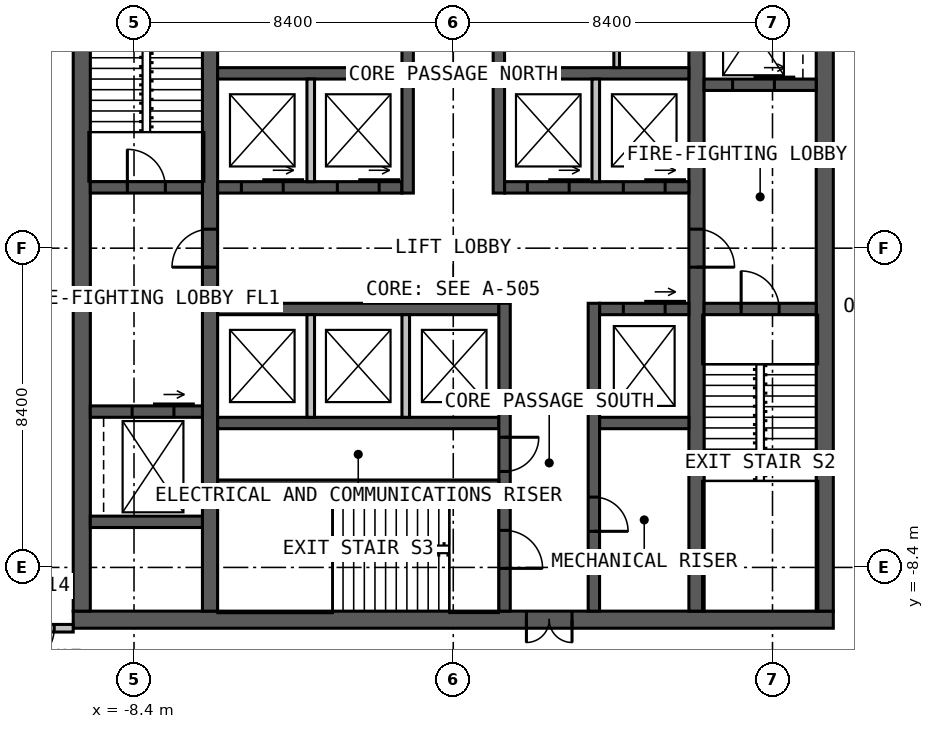
"""IFC4 building model, lengths in metres.
Left out: names, types, materials, properties, quantities, classifications, styles, units other than length and angle.
Written with IfcOpenShell. Run it as: python <this file> out.ifc"""

import sys

from ifc_helpers import new_model, si_unit, direction, frame, frame_2d, origin, place, context, subcontext, project, spatial, rectangle, extrude, element, fill, save


model = new_model("IFC4")
c1 = context("Model", 3, precision=1e-05, world=origin(), true_north=direction((0.0, 1.0)))
c2 = subcontext(c1, "Body", "Model", "MODEL_VIEW")
j1 = project(units=[si_unit("LENGTHUNIT", "METRE"), si_unit("PLANEANGLEUNIT", "RADIAN")], contexts=[c1])
p1 = place(None, origin())
s1 = spatial("IfcSite", under=j1, at=p1, CompositionType="ELEMENT")
p2 = place(p1, origin())
s2 = spatial("IfcBuilding", under=s1, at=p2, CompositionType="ELEMENT")
p3 = place(p2, frame((0.0, 0.0, 179.0)))
s3 = spatial("IfcBuildingStorey", under=s2, at=p3, CompositionType="ELEMENT", Elevation=179.0)
p4 = place(p3, frame((10.0, -9.775, 0.0), z_axis=(0.0, 0.0, 1.0), x_axis=(-1.0, 0.0, 0.0)))
e1 = element("IfcWall", 1, at=p4, inside=s3, PredefinedType="SOLIDWALL", context=c2, shape_type="SweptSolid", body=[
    extrude(rectangle(XDim=20.0, YDim=0.45, at=frame_2d((10.0, 0.0))), origin(), (0.0, 0.0, 1.0), 4.0),
])
p5 = place(p4, frame((6.875, 0.0, 0.0)))
e2 = element("IfcOpeningElement", 2, at=p5, cuts=e1, PredefinedType="OPENING", context=c2, shape_type="SweptSolid", body=[
    extrude(rectangle(XDim=1.2, YDim=2.2, at=frame_2d((0.6, 1.1))), frame((0.0, 0.235, 0.0), z_axis=(0.0, -1.0, 0.0), x_axis=(1.0, 0.0, 0.0)), (0.0, 0.0, 1.0), 0.47),
])
for number, where, z_axis, x_axis in (
    (3, (9.775, -9.55, 0.0), (0.0, 0.0, 1.0), (0.0, 1.0, 0.0)),
    (4, (-9.775, 9.55, 0.0), (0.0, 0.0, 1.0), (0.0, -1.0, 0.0)),
):
    element("IfcWall", number, at=place(p3, frame(where, z_axis=z_axis, x_axis=x_axis)), inside=s3, PredefinedType="SOLIDWALL", context=c2, shape_type="SweptSolid", body=[
        extrude(rectangle(XDim=19.1, YDim=0.45, at=frame_2d((9.55, 0.0))), origin(), (0.0, 0.0, 1.0), 4.0),
    ])
p6 = place(p3, frame((-6.4, -9.55, 0.0), z_axis=(0.0, 0.0, 1.0), x_axis=(0.0, 1.0, 0.0)))
e5 = element("IfcWall", 5, at=p6, inside=s3, PredefinedType="SOLIDWALL", context=c2, shape_type="SweptSolid", body=[
    extrude(rectangle(XDim=19.1, YDim=0.4, at=frame_2d((9.55, 0.0))), origin(), (0.0, 0.0, 1.0), 4.0),
])
p7 = place(p6, frame((9.05, 0.0, 0.0)))
e6 = element("IfcOpeningElement", 6, at=p7, cuts=e5, PredefinedType="OPENING", context=c2, shape_type="SweptSolid", body=[
    extrude(rectangle(XDim=1.0, YDim=2.2, at=frame_2d((0.5, 1.1))), frame((0.0, 0.21, 0.0), z_axis=(0.0, -1.0, 0.0), x_axis=(1.0, 0.0, 0.0)), (0.0, 0.0, 1.0), 0.42),
])
p8 = place(p3, frame((6.4, 9.55, 0.0), z_axis=(0.0, 0.0, 1.0), x_axis=(0.0, -1.0, 0.0)))
e7 = element("IfcWall", 7, at=p8, inside=s3, PredefinedType="SOLIDWALL", context=c2, shape_type="SweptSolid", body=[
    extrude(rectangle(XDim=19.1, YDim=0.4, at=frame_2d((9.55, 0.0))), origin(), (0.0, 0.0, 1.0), 4.0),
])
p9 = place(p8, frame((9.05, 0.0, 0.0)))
e8 = element("IfcOpeningElement", 8, at=p9, cuts=e7, PredefinedType="OPENING", context=c2, shape_type="SweptSolid", body=[
    extrude(rectangle(XDim=1.0, YDim=2.2, at=frame_2d((0.5, 1.1))), frame((0.0, 0.21, 0.0), z_axis=(0.0, -1.0, 0.0), x_axis=(1.0, 0.0, 0.0)), (0.0, 0.0, 1.0), 0.42),
])
p10 = place(p3, frame((-6.2, 1.6, 0.0), z_axis=(0.0, 0.0, 1.0), x_axis=(1.0, 0.0, 0.0)))
e9 = element("IfcWall", 9, at=p10, inside=s3, PredefinedType="SOLIDWALL", context=c2, shape_type="SweptSolid", body=[
    extrude(rectangle(XDim=4.85, YDim=0.3, at=frame_2d((2.425, 0.0))), origin(), (0.0, 0.0, 1.0), 4.0),
])
p11 = place(p10, frame((0.625, 0.0, 0.0)))
e10 = element("IfcOpeningElement", 10, at=p11, cuts=e9, PredefinedType="OPENING", context=c2, shape_type="SweptSolid", body=[
    extrude(rectangle(XDim=1.1, YDim=2.2, at=frame_2d((0.55, 1.1))), frame((0.0, 0.16, 0.0), z_axis=(0.0, -1.0, 0.0), x_axis=(1.0, 0.0, 0.0)), (0.0, 0.0, 1.0), 0.32),
])
p12 = place(p10, frame((3.15, 0.0, 0.0)))
e11 = element("IfcOpeningElement", 11, at=p12, cuts=e9, PredefinedType="OPENING", context=c2, shape_type="SweptSolid", body=[
    extrude(rectangle(XDim=1.1, YDim=2.2, at=frame_2d((0.55, 1.1))), frame((0.0, 0.16, 0.0), z_axis=(0.0, -1.0, 0.0), x_axis=(1.0, 0.0, 0.0)), (0.0, 0.0, 1.0), 0.32),
])
p13 = place(p3, frame((1.35, 1.6, 0.0), z_axis=(0.0, 0.0, 1.0), x_axis=(1.0, 0.0, 0.0)))
e12 = element("IfcWall", 12, at=p13, inside=s3, PredefinedType="SOLIDWALL", context=c2, shape_type="SweptSolid", body=[
    extrude(rectangle(XDim=4.85, YDim=0.3, at=frame_2d((2.425, 0.0))), origin(), (0.0, 0.0, 1.0), 4.0),
])
p14 = place(p13, frame((0.6, 0.0, 0.0)))
e13 = element("IfcOpeningElement", 13, at=p14, cuts=e12, PredefinedType="OPENING", context=c2, shape_type="SweptSolid", body=[
    extrude(rectangle(XDim=1.1, YDim=2.2, at=frame_2d((0.55, 1.1))), frame((0.0, 0.16, 0.0), z_axis=(0.0, -1.0, 0.0), x_axis=(1.0, 0.0, 0.0)), (0.0, 0.0, 1.0), 0.32),
])
p15 = place(p13, frame((3.125, 0.0, 0.0)))
e14 = element("IfcOpeningElement", 14, at=p15, cuts=e12, PredefinedType="OPENING", context=c2, shape_type="SweptSolid", body=[
    extrude(rectangle(XDim=1.1, YDim=2.2, at=frame_2d((0.55, 1.1))), frame((0.0, 0.16, 0.0), z_axis=(0.0, -1.0, 0.0), x_axis=(1.0, 0.0, 0.0)), (0.0, 0.0, 1.0), 0.32),
])
for number, where, z_axis, x_axis in (
    (15, (-6.2, 4.6, 0.0), (0.0, 0.0, 1.0), (1.0, 0.0, 0.0)),
    (16, (1.35, 4.6, 0.0), (0.0, 0.0, 1.0), (1.0, 0.0, 0.0)),
):
    element("IfcWall", number, at=place(p3, frame(where, z_axis=z_axis, x_axis=x_axis)), inside=s3, PredefinedType="SOLIDWALL", context=c2, shape_type="SweptSolid", body=[
        extrude(rectangle(XDim=4.85, YDim=0.3, at=frame_2d((2.425, 0.0))), origin(), (0.0, 0.0, 1.0), 4.0),
    ])
p16 = place(p3, frame((-1.2, 1.45, 0.0), z_axis=(0.0, 0.0, 1.0), x_axis=(0.0, 1.0, 0.0)))
e17 = element("IfcWall", 17, at=p16, inside=s3, PredefinedType="SOLIDWALL", context=c2, shape_type="SweptSolid", body=[
    extrude(rectangle(XDim=8.1, YDim=0.3, at=frame_2d((4.05, 0.0))), origin(), (0.0, 0.0, 1.0), 4.0),
])
p17 = place(p16, frame((5.05, 0.0, 0.0)))
e18 = element("IfcOpeningElement", 18, at=p17, cuts=e17, PredefinedType="OPENING", context=c2, shape_type="SweptSolid", body=[
    extrude(rectangle(XDim=1.0, YDim=2.2, at=frame_2d((0.5, 1.1))), frame((0.0, 0.16, 0.0), z_axis=(0.0, -1.0, 0.0), x_axis=(1.0, 0.0, 0.0)), (0.0, 0.0, 1.0), 0.32),
])
p18 = place(p3, frame((1.2, 1.45, 0.0), z_axis=(0.0, 0.0, 1.0), x_axis=(0.0, 1.0, 0.0)))
e19 = element("IfcWall", 19, at=p18, inside=s3, PredefinedType="SOLIDWALL", context=c2, shape_type="SweptSolid", body=[
    extrude(rectangle(XDim=8.1, YDim=0.3, at=frame_2d((4.05, 0.0))), origin(), (0.0, 0.0, 1.0), 4.0),
])
p19 = place(p18, frame((3.8, 0.0, 0.0)))
e20 = element("IfcOpeningElement", 20, at=p19, cuts=e19, PredefinedType="OPENING", context=c2, shape_type="SweptSolid", body=[
    extrude(rectangle(XDim=1.0, YDim=2.2, at=frame_2d((0.5, 1.1))), frame((0.0, 0.16, 0.0), z_axis=(0.0, -1.0, 0.0), x_axis=(1.0, 0.0, 0.0)), (0.0, 0.0, 1.0), 0.32),
])
p20 = place(p18, frame((6.15, 0.0, 0.0)))
e21 = element("IfcOpeningElement", 21, at=p20, cuts=e19, PredefinedType="OPENING", context=c2, shape_type="SweptSolid", body=[
    extrude(rectangle(XDim=1.0, YDim=2.2, at=frame_2d((0.5, 1.1))), frame((0.0, 0.16, 0.0), z_axis=(0.0, -1.0, 0.0), x_axis=(1.0, 0.0, 0.0)), (0.0, 0.0, 1.0), 0.32),
])
p21 = place(p3, frame((-6.2, -1.6, 0.0), z_axis=(0.0, 0.0, 1.0), x_axis=(1.0, 0.0, 0.0)))
e22 = element("IfcWall", 22, at=p21, inside=s3, PredefinedType="SOLIDWALL", context=c2, shape_type="SweptSolid", body=[
    extrude(rectangle(XDim=7.4, YDim=0.3, at=frame_2d((3.7, 0.0))), origin(), (0.0, 0.0, 1.0), 4.0),
])
p22 = place(p3, frame((3.85, -1.6, 0.0), z_axis=(0.0, 0.0, 1.0), x_axis=(1.0, 0.0, 0.0)))
e23 = element("IfcWall", 23, at=p22, inside=s3, PredefinedType="SOLIDWALL", context=c2, shape_type="SweptSolid", body=[
    extrude(rectangle(XDim=2.35, YDim=0.3, at=frame_2d((1.175, 0.0))), origin(), (0.0, 0.0, 1.0), 4.0),
])
p23 = place(p22, frame((0.625, 0.0, 0.0)))
e24 = element("IfcOpeningElement", 24, at=p23, cuts=e23, PredefinedType="OPENING", context=c2, shape_type="SweptSolid", body=[
    extrude(rectangle(XDim=1.1, YDim=2.2, at=frame_2d((0.55, 1.1))), frame((0.0, 0.16, 0.0), z_axis=(0.0, -1.0, 0.0), x_axis=(1.0, 0.0, 0.0)), (0.0, 0.0, 1.0), 0.32),
])
p24 = place(p3, frame((-6.2, -4.6, 0.0), z_axis=(0.0, 0.0, 1.0), x_axis=(1.0, 0.0, 0.0)))
e25 = element("IfcWall", 25, at=p24, inside=s3, PredefinedType="SOLIDWALL", context=c2, shape_type="SweptSolid", body=[
    extrude(rectangle(XDim=7.4, YDim=0.3, at=frame_2d((3.7, 0.0))), origin(), (0.0, 0.0, 1.0), 4.0),
])
p25 = place(p3, frame((3.85, -4.6, 0.0), z_axis=(0.0, 0.0, 1.0), x_axis=(1.0, 0.0, 0.0)))
e26 = element("IfcWall", 26, at=p25, inside=s3, PredefinedType="SOLIDWALL", context=c2, shape_type="SweptSolid", body=[
    extrude(rectangle(XDim=2.35, YDim=0.3, at=frame_2d((1.175, 0.0))), origin(), (0.0, 0.0, 1.0), 4.0),
])
p26 = place(p3, frame((1.35, -1.45, 0.0), z_axis=(0.0, 0.0, 1.0), x_axis=(0.0, -1.0, 0.0)))
e27 = element("IfcWall", 27, at=p26, inside=s3, PredefinedType="SOLIDWALL", context=c2, shape_type="SweptSolid", body=[
    extrude(rectangle(XDim=8.1, YDim=0.3, at=frame_2d((4.05, 0.0))), origin(), (0.0, 0.0, 1.0), 4.0),
])
p27 = place(p26, frame((5.975, 0.0, 0.0)))
e28 = element("IfcOpeningElement", 28, at=p27, cuts=e27, PredefinedType="OPENING", context=c2, shape_type="SweptSolid", body=[
    extrude(rectangle(XDim=1.0, YDim=2.2, at=frame_2d((0.5, 1.1))), frame((0.0, 0.16, 0.0), z_axis=(0.0, -1.0, 0.0), x_axis=(1.0, 0.0, 0.0)), (0.0, 0.0, 1.0), 0.32),
])
p28 = place(p26, frame((3.525, 0.0, 0.0)))
e29 = element("IfcOpeningElement", 29, at=p28, cuts=e27, PredefinedType="OPENING", context=c2, shape_type="SweptSolid", body=[
    extrude(rectangle(XDim=0.9, YDim=2.2, at=frame_2d((0.45, 1.1))), frame((0.0, 0.16, 0.0), z_axis=(0.0, -1.0, 0.0), x_axis=(1.0, 0.0, 0.0)), (0.0, 0.0, 1.0), 0.32),
])
p29 = place(p3, frame((3.7, -1.45, 0.0), z_axis=(0.0, 0.0, 1.0), x_axis=(0.0, -1.0, 0.0)))
e30 = element("IfcWall", 30, at=p29, inside=s3, PredefinedType="SOLIDWALL", context=c2, shape_type="SweptSolid", body=[
    extrude(rectangle(XDim=8.1, YDim=0.3, at=frame_2d((4.05, 0.0))), origin(), (0.0, 0.0, 1.0), 4.0),
])
p30 = place(p29, frame((5.1, 0.0, 0.0)))
e31 = element("IfcOpeningElement", 31, at=p30, cuts=e30, PredefinedType="OPENING", context=c2, shape_type="SweptSolid", body=[
    extrude(rectangle(XDim=0.9, YDim=2.2, at=frame_2d((0.45, 1.1))), frame((0.0, 0.16, 0.0), z_axis=(0.0, -1.0, 0.0), x_axis=(1.0, 0.0, 0.0)), (0.0, 0.0, 1.0), 0.32),
])
p31 = place(p3, frame((-6.2, -6.2, 0.0), z_axis=(0.0, 0.0, 1.0), x_axis=(1.0, 0.0, 0.0)))
e32 = element("IfcWall", 32, at=p31, inside=s3, PredefinedType="SOLIDWALL", context=c2, shape_type="SweptSolid", body=[
    extrude(rectangle(XDim=7.4, YDim=0.2, at=frame_2d((3.7, 0.0))), origin(), (0.0, 0.0, 1.0), 4.0),
])
p32 = place(p3, frame((-9.55, 1.6, 0.0), z_axis=(0.0, 0.0, 1.0), x_axis=(1.0, 0.0, 0.0)))
e33 = element("IfcWall", 33, at=p32, inside=s3, PredefinedType="SOLIDWALL", context=c2, shape_type="SweptSolid", body=[
    extrude(rectangle(XDim=2.95, YDim=0.3, at=frame_2d((1.475, 0.0))), origin(), (0.0, 0.0, 1.0), 4.0),
])
p33 = place(p32, frame((0.975, 0.0, 0.0)))
e34 = element("IfcOpeningElement", 34, at=p33, cuts=e33, PredefinedType="OPENING", context=c2, shape_type="SweptSolid", body=[
    extrude(rectangle(XDim=1.0, YDim=2.2, at=frame_2d((0.5, 1.1))), frame((0.0, 0.16, 0.0), z_axis=(0.0, -1.0, 0.0), x_axis=(1.0, 0.0, 0.0)), (0.0, 0.0, 1.0), 0.32),
])
p34 = place(p3, frame((6.6, -1.6, 0.0), z_axis=(0.0, 0.0, 1.0), x_axis=(1.0, 0.0, 0.0)))
e35 = element("IfcWall", 35, at=p34, inside=s3, PredefinedType="SOLIDWALL", context=c2, shape_type="SweptSolid", body=[
    extrude(rectangle(XDim=2.95, YDim=0.3, at=frame_2d((1.475, 0.0))), origin(), (0.0, 0.0, 1.0), 4.0),
])
p35 = place(p34, frame((0.975, 0.0, 0.0)))
e36 = element("IfcOpeningElement", 36, at=p35, cuts=e35, PredefinedType="OPENING", context=c2, shape_type="SweptSolid", body=[
    extrude(rectangle(XDim=1.0, YDim=2.2, at=frame_2d((0.5, 1.1))), frame((0.0, 0.16, 0.0), z_axis=(0.0, -1.0, 0.0), x_axis=(1.0, 0.0, 0.0)), (0.0, 0.0, 1.0), 0.32),
])
p36 = place(p3, frame((-9.55, -4.3, 0.0), z_axis=(0.0, 0.0, 1.0), x_axis=(1.0, 0.0, 0.0)))
e37 = element("IfcWall", 37, at=p36, inside=s3, PredefinedType="SOLIDWALL", context=c2, shape_type="SweptSolid", body=[
    extrude(rectangle(XDim=2.95, YDim=0.3, at=frame_2d((1.475, 0.0))), origin(), (0.0, 0.0, 1.0), 4.0),
])
p37 = place(p36, frame((1.1, 0.0, 0.0)))
e38 = element("IfcOpeningElement", 38, at=p37, cuts=e37, PredefinedType="OPENING", context=c2, shape_type="SweptSolid", body=[
    extrude(rectangle(XDim=1.1, YDim=2.2, at=frame_2d((0.55, 1.1))), frame((0.0, 0.16, 0.0), z_axis=(0.0, -1.0, 0.0), x_axis=(1.0, 0.0, 0.0)), (0.0, 0.0, 1.0), 0.32),
])
p38 = place(p3, frame((6.6, 4.3, 0.0), z_axis=(0.0, 0.0, 1.0), x_axis=(1.0, 0.0, 0.0)))
e39 = element("IfcWall", 39, at=p38, inside=s3, PredefinedType="SOLIDWALL", context=c2, shape_type="SweptSolid", body=[
    extrude(rectangle(XDim=2.95, YDim=0.3, at=frame_2d((1.475, 0.0))), origin(), (0.0, 0.0, 1.0), 4.0),
])
p39 = place(p38, frame((0.75, 0.0, 0.0)))
e40 = element("IfcOpeningElement", 40, at=p39, cuts=e39, PredefinedType="OPENING", context=c2, shape_type="SweptSolid", body=[
    extrude(rectangle(XDim=1.1, YDim=2.2, at=frame_2d((0.55, 1.1))), frame((0.0, 0.16, 0.0), z_axis=(0.0, -1.0, 0.0), x_axis=(1.0, 0.0, 0.0)), (0.0, 0.0, 1.0), 0.32),
])
p40 = place(p3, frame((-9.55, -7.2, 0.0), z_axis=(0.0, 0.0, 1.0), x_axis=(1.0, 0.0, 0.0)))
e41 = element("IfcWall", 41, at=p40, inside=s3, PredefinedType="SOLIDWALL", context=c2, shape_type="SweptSolid", body=[
    extrude(rectangle(XDim=2.95, YDim=0.3, at=frame_2d((1.475, 0.0))), origin(), (0.0, 0.0, 1.0), 4.0),
])
for number, where, z_axis, x_axis in (
    (42, (-3.75, 1.75, 0.0), (0.0, 0.0, 1.0), (0.0, 1.0, 0.0)),
    (43, (3.75, 1.75, 0.0), (0.0, 0.0, 1.0), (0.0, 1.0, 0.0)),
    (44, (-3.75, -1.75, 0.0), (0.0, 0.0, 1.0), (0.0, -1.0, 0.0)),
    (45, (-1.25, -1.75, 0.0), (0.0, 0.0, 1.0), (0.0, -1.0, 0.0)),
):
    element("IfcWall", number, at=place(p3, frame(where, z_axis=z_axis, x_axis=x_axis)), inside=s3, PredefinedType="SOLIDWALL", context=c2, shape_type="SweptSolid", body=[
        extrude(rectangle(XDim=2.7, YDim=0.2, at=frame_2d((1.35, 0.0))), origin(), (0.0, 0.0, 1.0), 3.75),
    ])
p41 = place(p3, frame((4.3, 4.75, 0.0), z_axis=(0.0, 0.0, 1.0), x_axis=(0.0, 1.0, 0.0)))
e46 = element("IfcWall", 46, at=p41, inside=s3, PredefinedType="PARTITIONING", context=c2, shape_type="SweptSolid", body=[
    extrude(rectangle(XDim=2.375, YDim=0.15, at=frame_2d((1.188, 0.0))), origin(), (0.0, 0.0, 1.0), 3.75),
])
p42 = place(p3, frame((-10.0, -10.0, 0.0), z_axis=(0.0, 0.0, 1.0), x_axis=(-1.0, 0.0, 0.0)))
e47 = element("IfcWall", 47, at=p42, inside=s3, PredefinedType="PARTITIONING", context=c2, shape_type="SweptSolid", body=[
    extrude(rectangle(XDim=2.0, YDim=0.2, at=frame_2d((1.0, 0.0))), origin(), (0.0, 0.0, 1.0), 3.8),
])
p43 = place(p42, frame((0.5, 0.0, 0.0)))
e48 = element("IfcOpeningElement", 48, at=p43, cuts=e47, PredefinedType="OPENING", context=c2, shape_type="SweptSolid", body=[
    extrude(rectangle(XDim=1.0, YDim=2.2, at=frame_2d((0.5, 1.1))), frame((0.0, 0.11, 0.0), z_axis=(0.0, -1.0, 0.0), x_axis=(1.0, 0.0, 0.0)), (0.0, 0.0, 1.0), 0.22),
])
p44 = place(p5, origin())
e49 = element("IfcDoor", 49, at=p44, inside=s3, OperationType="DOUBLE_DOOR_SINGLE_SWING", PredefinedType="DOOR", context=c2, shape_type="SweptSolid", body=[
    extrude(rectangle(XDim=1.2, YDim=2.2, at=frame_2d((0.6, 1.1))), frame((0.0, 0.025, 0.0), z_axis=(0.0, -1.0, 0.0), x_axis=(1.0, 0.0, 0.0)), (0.0, 0.0, 1.0), 0.05),
])
fill(e2, e49)
p45 = place(p7, origin())
e50 = element("IfcDoor", 50, at=p45, inside=s3, OperationType="SINGLE_SWING_LEFT", PredefinedType="DOOR", context=c2, shape_type="SweptSolid", body=[
    extrude(rectangle(XDim=1.0, YDim=2.2, at=frame_2d((0.5, 1.1))), frame((0.0, 0.025, 0.0), z_axis=(0.0, -1.0, 0.0), x_axis=(1.0, 0.0, 0.0)), (0.0, 0.0, 1.0), 0.05),
])
fill(e6, e50)
p46 = place(p9, origin())
e51 = element("IfcDoor", 51, at=p46, inside=s3, OperationType="SINGLE_SWING_RIGHT", PredefinedType="DOOR", context=c2, shape_type="SweptSolid", body=[
    extrude(rectangle(XDim=1.0, YDim=2.2, at=frame_2d((0.5, 1.1))), frame((0.0, 0.025, 0.0), z_axis=(0.0, -1.0, 0.0), x_axis=(1.0, 0.0, 0.0)), (0.0, 0.0, 1.0), 0.05),
])
fill(e8, e51)
p47 = place(p33, origin())
e52 = element("IfcDoor", 52, at=p47, inside=s3, OperationType="SINGLE_SWING_LEFT", PredefinedType="DOOR", context=c2, shape_type="SweptSolid", body=[
    extrude(rectangle(XDim=1.0, YDim=2.2, at=frame_2d((0.5, 1.1))), frame((0.0, 0.025, 0.0), z_axis=(0.0, -1.0, 0.0), x_axis=(1.0, 0.0, 0.0)), (0.0, 0.0, 1.0), 0.05),
])
fill(e34, e52)
p48 = place(p35, origin())
e53 = element("IfcDoor", 53, at=p48, inside=s3, OperationType="SINGLE_SWING_LEFT", PredefinedType="DOOR", context=c2, shape_type="SweptSolid", body=[
    extrude(rectangle(XDim=1.0, YDim=2.2, at=frame_2d((0.5, 1.1))), frame((0.0, 0.025, 0.0), z_axis=(0.0, -1.0, 0.0), x_axis=(1.0, 0.0, 0.0)), (0.0, 0.0, 1.0), 0.05),
])
fill(e36, e53)
p49 = place(p27, origin())
e54 = element("IfcDoor", 54, at=p49, inside=s3, OperationType="SINGLE_SWING_RIGHT", PredefinedType="DOOR", context=c2, shape_type="SweptSolid", body=[
    extrude(rectangle(XDim=1.0, YDim=2.2, at=frame_2d((0.5, 1.1))), frame((0.0, 0.025, 0.0), z_axis=(0.0, -1.0, 0.0), x_axis=(1.0, 0.0, 0.0)), (0.0, 0.0, 1.0), 0.05),
])
fill(e28, e54)
p50 = place(p28, origin())
e55 = element("IfcDoor", 55, at=p50, inside=s3, OperationType="SINGLE_SWING_LEFT", PredefinedType="DOOR", context=c2, shape_type="SweptSolid", body=[
    extrude(rectangle(XDim=0.9, YDim=2.2, at=frame_2d((0.45, 1.1))), frame((0.0, 0.025, 0.0), z_axis=(0.0, -1.0, 0.0), x_axis=(1.0, 0.0, 0.0)), (0.0, 0.0, 1.0), 0.05),
])
fill(e29, e55)
p51 = place(p30, origin())
e56 = element("IfcDoor", 56, at=p51, inside=s3, OperationType="SINGLE_SWING_RIGHT", PredefinedType="DOOR", context=c2, shape_type="SweptSolid", body=[
    extrude(rectangle(XDim=0.9, YDim=2.2, at=frame_2d((0.45, 1.1))), frame((0.0, 0.025, 0.0), z_axis=(0.0, -1.0, 0.0), x_axis=(1.0, 0.0, 0.0)), (0.0, 0.0, 1.0), 0.05),
])
fill(e31, e56)
p52 = place(p11, origin())
e57 = element("IfcDoor", 57, at=p52, inside=s3, OperationType="SLIDING_TO_LEFT", PredefinedType="DOOR", context=c2, shape_type="SweptSolid", body=[
    extrude(rectangle(XDim=1.1, YDim=2.2, at=frame_2d((0.55, 1.1))), frame((0.0, 0.025, 0.0), z_axis=(0.0, -1.0, 0.0), x_axis=(1.0, 0.0, 0.0)), (0.0, 0.0, 1.0), 0.05),
])
fill(e10, e57)
p53 = place(p12, origin())
e58 = element("IfcDoor", 58, at=p53, inside=s3, OperationType="SLIDING_TO_LEFT", PredefinedType="DOOR", context=c2, shape_type="SweptSolid", body=[
    extrude(rectangle(XDim=1.1, YDim=2.2, at=frame_2d((0.55, 1.1))), frame((0.0, 0.025, 0.0), z_axis=(0.0, -1.0, 0.0), x_axis=(1.0, 0.0, 0.0)), (0.0, 0.0, 1.0), 0.05),
])
fill(e11, e58)
p54 = place(p14, origin())
e59 = element("IfcDoor", 59, at=p54, inside=s3, OperationType="SLIDING_TO_LEFT", PredefinedType="DOOR", context=c2, shape_type="SweptSolid", body=[
    extrude(rectangle(XDim=1.1, YDim=2.2, at=frame_2d((0.55, 1.1))), frame((0.0, 0.025, 0.0), z_axis=(0.0, -1.0, 0.0), x_axis=(1.0, 0.0, 0.0)), (0.0, 0.0, 1.0), 0.05),
])
fill(e13, e59)
p55 = place(p15, origin())
e60 = element("IfcDoor", 60, at=p55, inside=s3, OperationType="SLIDING_TO_LEFT", PredefinedType="DOOR", context=c2, shape_type="SweptSolid", body=[
    extrude(rectangle(XDim=1.1, YDim=2.2, at=frame_2d((0.55, 1.1))), frame((0.0, 0.025, 0.0), z_axis=(0.0, -1.0, 0.0), x_axis=(1.0, 0.0, 0.0)), (0.0, 0.0, 1.0), 0.05),
])
fill(e14, e60)
p56 = place(p23, origin())
e61 = element("IfcDoor", 61, at=p56, inside=s3, OperationType="SLIDING_TO_LEFT", PredefinedType="DOOR", context=c2, shape_type="SweptSolid", body=[
    extrude(rectangle(XDim=1.1, YDim=2.2, at=frame_2d((0.55, 1.1))), frame((0.0, 0.025, 0.0), z_axis=(0.0, -1.0, 0.0), x_axis=(1.0, 0.0, 0.0)), (0.0, 0.0, 1.0), 0.05),
])
fill(e24, e61)
p57 = place(p37, origin())
e62 = element("IfcDoor", 62, at=p57, inside=s3, OperationType="SLIDING_TO_LEFT", PredefinedType="DOOR", context=c2, shape_type="SweptSolid", body=[
    extrude(rectangle(XDim=1.1, YDim=2.2, at=frame_2d((0.55, 1.1))), frame((0.0, 0.025, 0.0), z_axis=(0.0, -1.0, 0.0), x_axis=(1.0, 0.0, 0.0)), (0.0, 0.0, 1.0), 0.05),
])
fill(e38, e62)
p58 = place(p39, origin())
e63 = element("IfcDoor", 63, at=p58, inside=s3, OperationType="SLIDING_TO_LEFT", PredefinedType="DOOR", context=c2, shape_type="SweptSolid", body=[
    extrude(rectangle(XDim=1.1, YDim=2.2, at=frame_2d((0.55, 1.1))), frame((0.0, 0.025, 0.0), z_axis=(0.0, -1.0, 0.0), x_axis=(1.0, 0.0, 0.0)), (0.0, 0.0, 1.0), 0.05),
])
fill(e40, e63)
p59 = place(p43, origin())
e64 = element("IfcDoor", 64, at=p59, inside=s3, OperationType="SINGLE_SWING_RIGHT", PredefinedType="DOOR", context=c2, shape_type="SweptSolid", body=[
    extrude(rectangle(XDim=1.0, YDim=2.2, at=frame_2d((0.5, 1.1))), frame((0.0, 0.025, 0.0), z_axis=(0.0, -1.0, 0.0), x_axis=(1.0, 0.0, 0.0)), (0.0, 0.0, 1.0), 0.05),
])
fill(e48, e64)
save(model, sys.argv[1])
